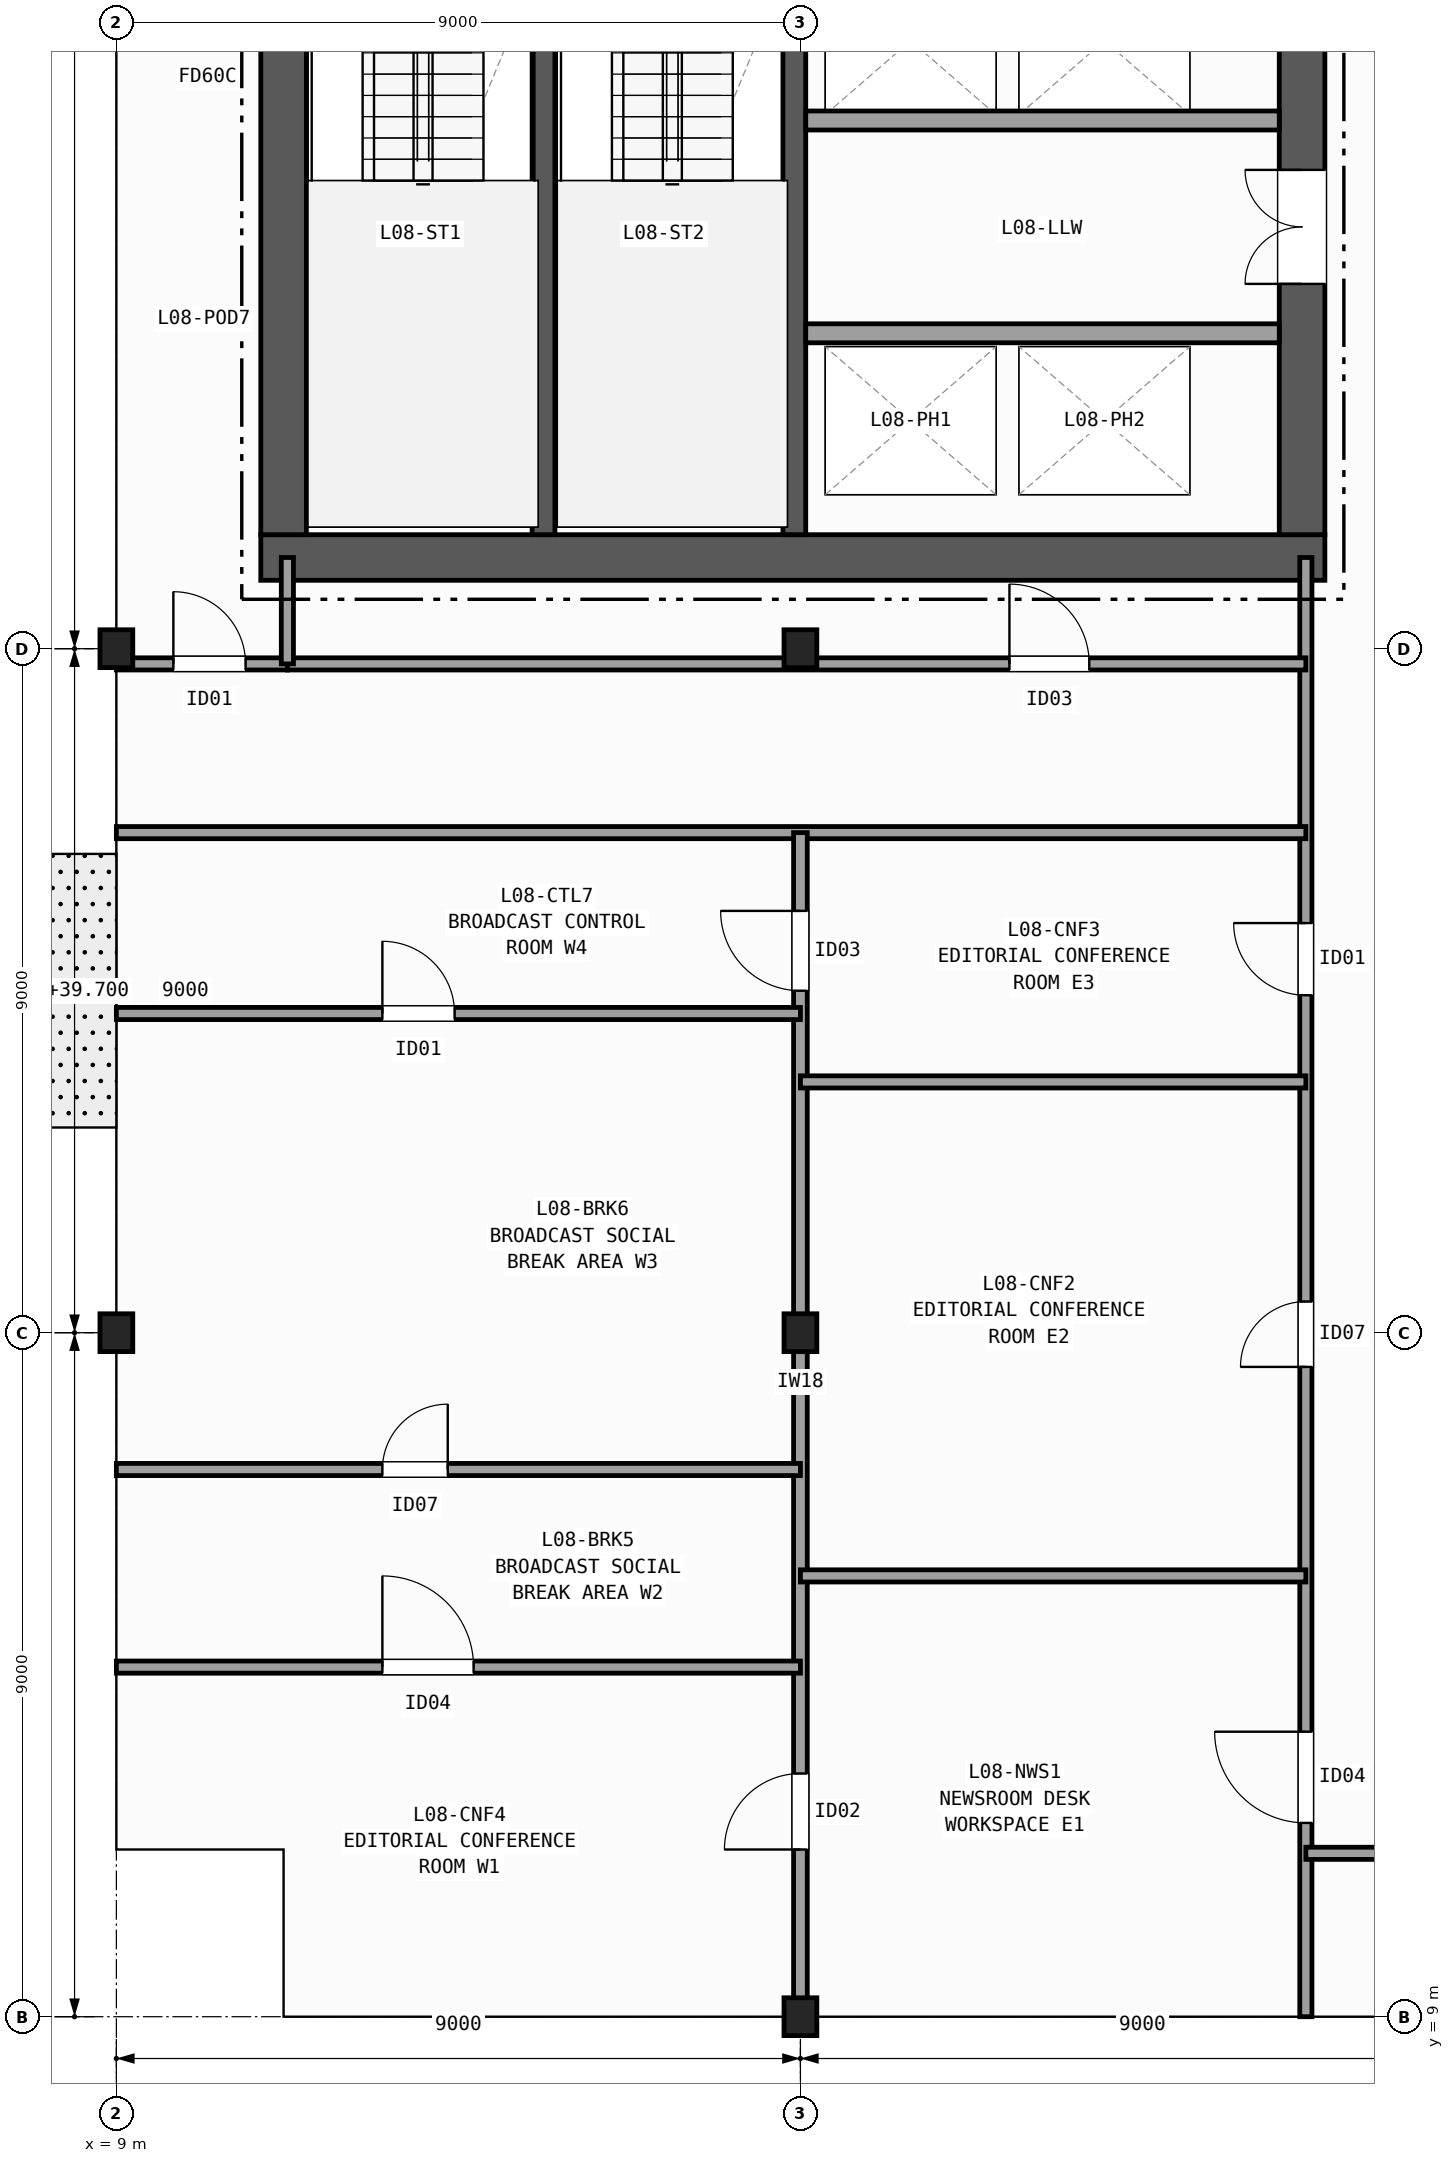
"""IFC4 building model, lengths in metres.
Left out: names, types, materials, properties, quantities, classifications, styles, units other than length and angle.
Written with IfcOpenShell. Run it as: python <this file> out.ifc"""

import sys

from ifc_helpers import new_model, si_unit, direction, frame, frame_2d, origin, origin_2d, place, context, subcontext, project, spatial, rectangle, i_section, extrude, element, fill, save


model = new_model("IFC4")
c1 = context("Model", 3, precision=1e-05, world=origin(), true_north=direction((0.0, 1.0)))
c2 = subcontext(c1, "Body", "Model", "MODEL_VIEW")
j1 = project(units=[si_unit("LENGTHUNIT", "METRE"), si_unit("PLANEANGLEUNIT", "RADIAN")], contexts=[c1])
p1 = place(None, origin())
s1 = spatial("IfcSite", under=j1, at=p1, CompositionType="ELEMENT")
p2 = place(p1, origin())
s2 = spatial("IfcBuilding", under=s1, at=p2, CompositionType="ELEMENT")
p3 = place(p2, frame((0.0, 0.0, 39.7)))
s3 = spatial("IfcBuildingStorey", under=s2, at=p3, CompositionType="ELEMENT", Elevation=39.7)
for number, where, z_axis, x_axis in (
    (1, (9.0, 18.0, 0.0), (0.0, 0.0, 1.0), (1.0, 0.0, 0.0)),
    (2, (9.0, 27.0, 0.0), (0.0, 0.0, 1.0), (1.0, 0.0, 0.0)),
    (3, (18.0, 9.0, 0.0), (0.0, 0.0, 1.0), (1.0, 0.0, 0.0)),
    (4, (18.0, 18.0, 0.0), (0.0, 0.0, 1.0), (1.0, 0.0, 0.0)),
    (5, (18.0, 27.0, 0.0), (0.0, 0.0, 1.0), (1.0, 0.0, 0.0)),
):
    element("IfcColumn", number, at=place(p3, frame(where, z_axis=z_axis, x_axis=x_axis)), inside=s3, PredefinedType="COLUMN", context=c2, shape_type="SweptSolid", body=[
        extrude(i_section(OverallWidth=0.432, OverallDepth=0.498, WebThickness=0.056, FlangeThickness=0.089, FilletRadius=0.015, at=origin_2d()), origin(), (0.0, 0.0, 1.0), 3.7),
    ])
p4 = place(p3, frame((10.9, 28.2, 0.0), z_axis=(0.0, 0.0, 1.0), x_axis=(1.0, 0.0, 0.0)))
e6 = element("IfcWall", 6, at=p4, inside=s3, PredefinedType="SHEAR", context=c2, shape_type="SweptSolid", body=[
    extrude(rectangle(XDim=14.0, YDim=0.6, at=frame_2d((7.0, 0.0))), origin(), (0.0, 0.0, 1.0), 3.42),
])
p5 = place(p3, frame((11.2, 42.1, 0.0), z_axis=(0.0, 0.0, 1.0), x_axis=(0.0, -1.0, 0.0)))
e7 = element("IfcWall", 7, at=p5, inside=s3, PredefinedType="SHEAR", context=c2, shape_type="SweptSolid", body=[
    extrude(rectangle(XDim=13.6, YDim=0.6, at=frame_2d((6.8, 0.0))), origin(), (0.0, 0.0, 1.0), 3.42),
])
p6 = place(p3, frame((24.6, 28.5, 0.0), z_axis=(0.0, 0.0, 1.0), x_axis=(0.0, 1.0, 0.0)))
e8 = element("IfcWall", 8, at=p6, inside=s3, PredefinedType="SHEAR", context=c2, shape_type="SweptSolid", body=[
    extrude(rectangle(XDim=13.6, YDim=0.6, at=frame_2d((6.8, 0.0))), origin(), (0.0, 0.0, 1.0), 3.42),
])
p7 = place(p6, frame((3.3, 0.0, 0.0)))
e9 = element("IfcOpeningElement", 9, at=p7, cuts=e8, PredefinedType="OPENING", context=c2, shape_type="SweptSolid", body=[
    extrude(rectangle(XDim=1.5, YDim=2.2, at=frame_2d((0.75, 1.1))), frame((0.0, 0.31, 0.0), z_axis=(0.0, -1.0, 0.0), x_axis=(1.0, 0.0, 0.0)), (0.0, 0.0, 1.0), 0.62),
])
p8 = place(p6, frame((9.9, 0.0, 0.0)))
e10 = element("IfcOpeningElement", 10, at=p8, cuts=e8, PredefinedType="OPENING", context=c2, shape_type="SweptSolid", body=[
    extrude(rectangle(XDim=0.9, YDim=2.1, at=frame_2d((0.45, 1.05))), frame((0.0, 0.31, 0.0), z_axis=(0.0, -1.0, 0.0), x_axis=(1.0, 0.0, 0.0)), (0.0, 0.0, 1.0), 0.62),
])
p9 = place(p3, frame((14.62, 28.5, 0.0), z_axis=(0.0, 0.0, 1.0), x_axis=(0.0, 1.0, 0.0)))
e11 = element("IfcWall", 11, at=p9, inside=s3, PredefinedType="SHEAR", context=c2, shape_type="SweptSolid", body=[
    extrude(rectangle(XDim=8.95, YDim=0.3, at=frame_2d((4.475, 0.0))), origin(), (0.0, 0.0, 1.0), 3.42),
])
p10 = place(p3, frame((17.92, 42.1, 0.0), z_axis=(0.0, 0.0, 1.0), x_axis=(0.0, -1.0, 0.0)))
e12 = element("IfcWall", 12, at=p10, inside=s3, PredefinedType="SHEAR", context=c2, shape_type="SweptSolid", body=[
    extrude(rectangle(XDim=13.6, YDim=0.3, at=frame_2d((6.8, 0.0))), origin(), (0.0, 0.0, 1.0), 3.42),
])
p11 = place(p10, frame((1.925, 0.0, 0.0)))
e13 = element("IfcOpeningElement", 13, at=p11, cuts=e12, PredefinedType="OPENING", context=c2, shape_type="SweptSolid", body=[
    extrude(rectangle(XDim=1.15, YDim=2.15, at=frame_2d((0.575, 1.075))), frame((0.0, 0.16, 0.0), z_axis=(0.0, -1.0, 0.0), x_axis=(1.0, 0.0, 0.0)), (0.0, 0.0, 1.0), 0.32),
])
for number, where, z_axis, x_axis in (
    (14, (18.07, 31.15, 0.0), (0.0, 0.0, 1.0), (1.0, 0.0, 0.0)),
    (15, (24.3, 33.95, 0.0), (0.0, 0.0, 1.0), (-1.0, 0.0, 0.0)),
):
    element("IfcWall", number, at=place(p3, frame(where, z_axis=z_axis, x_axis=x_axis)), inside=s3, PredefinedType="PARTITIONING", context=c2, shape_type="SweptSolid", body=[
        extrude(rectangle(XDim=6.23, YDim=0.25, at=frame_2d((3.115, 0.0))), origin(), (0.0, 0.0, 1.0), 3.42),
    ])
p12 = place(p3, frame((9.0, 26.8, 0.0), z_axis=(0.0, 0.0, 1.0), x_axis=(1.0, 0.0, 0.0)))
e16 = element("IfcWall", 16, at=p12, inside=s3, PredefinedType="PARTITIONING", context=c2, shape_type="SweptSolid", body=[
    extrude(rectangle(XDim=2.25, YDim=0.16, at=frame_2d((1.125, 0.0))), origin(), (0.0, 0.0, 1.0), 2.627),
])
p13 = place(p12, frame((0.75, 0.0, 0.0)))
e17 = element("IfcOpeningElement", 17, at=p13, cuts=e16, PredefinedType="OPENING", context=c2, shape_type="SweptSolid", body=[
    extrude(rectangle(XDim=0.95, YDim=2.1, at=frame_2d((0.475, 1.05))), frame((0.0, 0.09, 0.0), z_axis=(0.0, -1.0, 0.0), x_axis=(1.0, 0.0, 0.0)), (0.0, 0.0, 1.0), 0.18),
])
p14 = place(p3, frame((24.65, 9.0, 0.0), z_axis=(0.0, 0.0, 1.0), x_axis=(0.0, 1.0, 0.0)))
e18 = element("IfcWall", 18, at=p14, inside=s3, PredefinedType="PARTITIONING", context=c2, shape_type="SweptSolid", body=[
    extrude(rectangle(XDim=19.2, YDim=0.16, at=frame_2d((9.6, 0.0))), origin(), (0.0, 0.0, 1.0), 2.627),
])
p15 = place(p14, frame((2.55, 0.0, 0.0)))
e19 = element("IfcOpeningElement", 19, at=p15, cuts=e18, PredefinedType="OPENING", context=c2, shape_type="SweptSolid", body=[
    extrude(rectangle(XDim=1.2, YDim=2.15, at=frame_2d((0.6, 1.075))), frame((0.0, 0.09, 0.0), z_axis=(0.0, -1.0, 0.0), x_axis=(1.0, 0.0, 0.0)), (0.0, 0.0, 1.0), 0.18),
])
p16 = place(p14, frame((8.55, 0.0, 0.0)))
e20 = element("IfcOpeningElement", 20, at=p16, cuts=e18, PredefinedType="OPENING", context=c2, shape_type="SweptSolid", body=[
    extrude(rectangle(XDim=0.86, YDim=2.05, at=frame_2d((0.43, 1.025))), frame((0.0, 0.09, 0.0), z_axis=(0.0, -1.0, 0.0), x_axis=(1.0, 0.0, 0.0)), (0.0, 0.0, 1.0), 0.18),
])
p17 = place(p14, frame((13.44, 0.0, 0.0)))
e21 = element("IfcOpeningElement", 21, at=p17, cuts=e18, PredefinedType="OPENING", context=c2, shape_type="SweptSolid", body=[
    extrude(rectangle(XDim=0.95, YDim=2.1, at=frame_2d((0.475, 1.05))), frame((0.0, 0.09, 0.0), z_axis=(0.0, -1.0, 0.0), x_axis=(1.0, 0.0, 0.0)), (0.0, 0.0, 1.0), 0.18),
])
p18 = place(p3, frame((9.0, 24.58, 0.0), z_axis=(0.0, 0.0, 1.0), x_axis=(1.0, 0.0, 0.0)))
e22 = element("IfcWall", 22, at=p18, inside=s3, PredefinedType="PARTITIONING", context=c2, shape_type="SweptSolid", body=[
    extrude(rectangle(XDim=15.65, YDim=0.16, at=frame_2d((7.825, 0.0))), origin(), (0.0, 0.0, 1.0), 2.627),
])
p19 = place(p3, frame((11.25, 26.8, 0.0), z_axis=(0.0, 0.0, 1.0), x_axis=(1.0, 0.0, 0.0)))
e23 = element("IfcWall", 23, at=p19, inside=s3, PredefinedType="PARTITIONING", context=c2, shape_type="SweptSolid", body=[
    extrude(rectangle(XDim=13.4, YDim=0.16, at=frame_2d((6.7, 0.0))), origin(), (0.0, 0.0, 1.0), 2.789),
])
p20 = place(p19, frame((9.5, 0.0, 0.0)))
e24 = element("IfcOpeningElement", 24, at=p20, cuts=e23, PredefinedType="OPENING", context=c2, shape_type="SweptSolid", body=[
    extrude(rectangle(XDim=1.05, YDim=2.15, at=frame_2d((0.525, 1.075))), frame((0.0, 0.09, 0.0), z_axis=(0.0, -1.0, 0.0), x_axis=(1.0, 0.0, 0.0)), (0.0, 0.0, 1.0), 0.18),
])
p21 = place(p3, frame((11.25, 26.8, 0.0), z_axis=(0.0, 0.0, 1.0), x_axis=(0.0, 1.0, 0.0)))
e25 = element("IfcWall", 25, at=p21, inside=s3, PredefinedType="PARTITIONING", context=c2, shape_type="SweptSolid", body=[
    extrude(rectangle(XDim=1.4, YDim=0.16, at=frame_2d((0.7, 0.0))), origin(), (0.0, 0.0, 1.0), 2.789),
])
p22 = place(p3, frame((18.0, 9.0, 0.0), z_axis=(0.0, 0.0, 1.0), x_axis=(0.0, 1.0, 0.0)))
e26 = element("IfcWall", 26, at=p22, inside=s3, PredefinedType="PARTITIONING", context=c2, shape_type="SweptSolid", body=[
    extrude(rectangle(XDim=15.58, YDim=0.18, at=frame_2d((7.79, 0.0))), origin(), (0.0, 0.0, 1.0), 2.627),
])
p23 = place(p22, frame((2.2, 0.0, 0.0)))
e27 = element("IfcOpeningElement", 27, at=p23, cuts=e26, PredefinedType="OPENING", context=c2, shape_type="SweptSolid", body=[
    extrude(rectangle(XDim=1.0, YDim=2.1, at=frame_2d((0.5, 1.05))), frame((0.0, 0.1, 0.0), z_axis=(0.0, -1.0, 0.0), x_axis=(1.0, 0.0, 0.0)), (0.0, 0.0, 1.0), 0.2),
])
p24 = place(p22, frame((13.5, 0.0, 0.0)))
e28 = element("IfcOpeningElement", 28, at=p24, cuts=e26, PredefinedType="OPENING", context=c2, shape_type="SweptSolid", body=[
    extrude(rectangle(XDim=1.05, YDim=2.15, at=frame_2d((0.525, 1.075))), frame((0.0, 0.1, 0.0), z_axis=(0.0, -1.0, 0.0), x_axis=(1.0, 0.0, 0.0)), (0.0, 0.0, 1.0), 0.2),
])
p25 = place(p3, frame((18.0, 14.8, 0.0), z_axis=(0.0, 0.0, 1.0), x_axis=(1.0, 0.0, 0.0)))
e29 = element("IfcWall", 29, at=p25, inside=s3, PredefinedType="PARTITIONING", context=c2, shape_type="SweptSolid", body=[
    extrude(rectangle(XDim=6.65, YDim=0.16, at=frame_2d((3.325, 0.0))), origin(), (0.0, 0.0, 1.0), 2.789),
])
p26 = place(p3, frame((18.0, 21.3, 0.0), z_axis=(0.0, 0.0, 1.0), x_axis=(1.0, 0.0, 0.0)))
e30 = element("IfcWall", 30, at=p26, inside=s3, PredefinedType="PARTITIONING", context=c2, shape_type="SweptSolid", body=[
    extrude(rectangle(XDim=6.65, YDim=0.16, at=frame_2d((3.325, 0.0))), origin(), (0.0, 0.0, 1.0), 2.792),
])
p27 = place(p3, frame((9.0, 13.6, 0.0), z_axis=(0.0, 0.0, 1.0), x_axis=(1.0, 0.0, 0.0)))
e31 = element("IfcWall", 31, at=p27, inside=s3, PredefinedType="PARTITIONING", context=c2, shape_type="SweptSolid", body=[
    extrude(rectangle(XDim=9.0, YDim=0.16, at=frame_2d((4.5, 0.0))), origin(), (0.0, 0.0, 1.0), 2.792),
])
p28 = place(p27, frame((3.5, 0.0, 0.0)))
e32 = element("IfcOpeningElement", 32, at=p28, cuts=e31, PredefinedType="OPENING", context=c2, shape_type="SweptSolid", body=[
    extrude(rectangle(XDim=1.2, YDim=2.15, at=frame_2d((0.6, 1.075))), frame((0.0, 0.09, 0.0), z_axis=(0.0, -1.0, 0.0), x_axis=(1.0, 0.0, 0.0)), (0.0, 0.0, 1.0), 0.18),
])
p29 = place(p3, frame((9.0, 16.2, 0.0), z_axis=(0.0, 0.0, 1.0), x_axis=(1.0, 0.0, 0.0)))
e33 = element("IfcWall", 33, at=p29, inside=s3, PredefinedType="PARTITIONING", context=c2, shape_type="SweptSolid", body=[
    extrude(rectangle(XDim=9.0, YDim=0.16, at=frame_2d((4.5, 0.0))), origin(), (0.0, 0.0, 1.0), 2.792),
])
p30 = place(p29, frame((3.5, 0.0, 0.0)))
e34 = element("IfcOpeningElement", 34, at=p30, cuts=e33, PredefinedType="OPENING", context=c2, shape_type="SweptSolid", body=[
    extrude(rectangle(XDim=0.86, YDim=2.05, at=frame_2d((0.43, 1.025))), frame((0.0, 0.09, 0.0), z_axis=(0.0, -1.0, 0.0), x_axis=(1.0, 0.0, 0.0)), (0.0, 0.0, 1.0), 0.18),
])
p31 = place(p3, frame((9.0, 22.2, 0.0), z_axis=(0.0, 0.0, 1.0), x_axis=(1.0, 0.0, 0.0)))
e35 = element("IfcWall", 35, at=p31, inside=s3, PredefinedType="PARTITIONING", context=c2, shape_type="SweptSolid", body=[
    extrude(rectangle(XDim=9.0, YDim=0.16, at=frame_2d((4.5, 0.0))), origin(), (0.0, 0.0, 1.0), 2.627),
])
p32 = place(p31, frame((3.5, 0.0, 0.0)))
e36 = element("IfcOpeningElement", 36, at=p32, cuts=e35, PredefinedType="OPENING", context=c2, shape_type="SweptSolid", body=[
    extrude(rectangle(XDim=0.95, YDim=2.1, at=frame_2d((0.475, 1.05))), frame((0.0, 0.09, 0.0), z_axis=(0.0, -1.0, 0.0), x_axis=(1.0, 0.0, 0.0)), (0.0, 0.0, 1.0), 0.18),
])
p33 = place(p3, frame((24.65, 11.15, 0.0), z_axis=(0.0, 0.0, 1.0), x_axis=(1.0, 0.0, 0.0)))
e37 = element("IfcWall", 37, at=p33, inside=s3, PredefinedType="PARTITIONING", context=c2, shape_type="SweptSolid", body=[
    extrude(rectangle(XDim=4.75, YDim=0.16, at=frame_2d((2.375, 0.0))), origin(), (0.0, 0.0, 1.0), 2.792),
])
p34 = place(p33, frame((1.2, 0.0, 0.0)))
e38 = element("IfcOpeningElement", 38, at=p34, cuts=e37, PredefinedType="OPENING", context=c2, shape_type="SweptSolid", body=[
    extrude(rectangle(XDim=0.86, YDim=2.05, at=frame_2d((0.43, 1.025))), frame((0.0, 0.09, 0.0), z_axis=(0.0, -1.0, 0.0), x_axis=(1.0, 0.0, 0.0)), (0.0, 0.0, 1.0), 0.18),
])
p35 = place(p7, origin())
e39 = element("IfcDoor", 39, at=p35, inside=s3, OperationType="DOUBLE_DOOR_SINGLE_SWING", PredefinedType="DOOR", context=c2, shape_type="SweptSolid", body=[
    extrude(rectangle(XDim=1.5, YDim=2.2, at=frame_2d((0.75, 1.1))), frame((0.0, 0.025, 0.0), z_axis=(0.0, -1.0, 0.0), x_axis=(1.0, 0.0, 0.0)), (0.0, 0.0, 1.0), 0.05),
])
fill(e9, e39)
p36 = place(p13, origin())
e40 = element("IfcDoor", 40, at=p36, inside=s3, OperationType="SINGLE_SWING_LEFT", PredefinedType="DOOR", context=c2, shape_type="SweptSolid", body=[
    extrude(rectangle(XDim=0.95, YDim=2.1, at=frame_2d((0.475, 1.05))), frame((0.0, 0.025, 0.0), z_axis=(0.0, -1.0, 0.0), x_axis=(1.0, 0.0, 0.0)), (0.0, 0.0, 1.0), 0.05),
])
fill(e17, e40)
p37 = place(p20, origin())
e41 = element("IfcDoor", 41, at=p37, inside=s3, OperationType="SINGLE_SWING_LEFT", PredefinedType="DOOR", context=c2, shape_type="SweptSolid", body=[
    extrude(rectangle(XDim=1.05, YDim=2.15, at=frame_2d((0.525, 1.075))), frame((0.0, 0.025, 0.0), z_axis=(0.0, -1.0, 0.0), x_axis=(1.0, 0.0, 0.0)), (0.0, 0.0, 1.0), 0.05),
])
fill(e24, e41)
p38 = place(p15, origin())
e42 = element("IfcDoor", 42, at=p38, inside=s3, OperationType="SINGLE_SWING_RIGHT", PredefinedType="DOOR", context=c2, shape_type="SweptSolid", body=[
    extrude(rectangle(XDim=1.2, YDim=2.15, at=frame_2d((0.6, 1.075))), frame((0.0, 0.025, 0.0), z_axis=(0.0, -1.0, 0.0), x_axis=(1.0, 0.0, 0.0)), (0.0, 0.0, 1.0), 0.05),
])
fill(e19, e42)
p39 = place(p16, origin())
e43 = element("IfcDoor", 43, at=p39, inside=s3, OperationType="SINGLE_SWING_LEFT", PredefinedType="DOOR", context=c2, shape_type="SweptSolid", body=[
    extrude(rectangle(XDim=0.86, YDim=2.05, at=frame_2d((0.43, 1.025))), frame((0.0, 0.025, 0.0), z_axis=(0.0, -1.0, 0.0), x_axis=(1.0, 0.0, 0.0)), (0.0, 0.0, 1.0), 0.05),
])
fill(e20, e43)
p40 = place(p17, origin())
e44 = element("IfcDoor", 44, at=p40, inside=s3, OperationType="SINGLE_SWING_RIGHT", PredefinedType="DOOR", context=c2, shape_type="SweptSolid", body=[
    extrude(rectangle(XDim=0.95, YDim=2.1, at=frame_2d((0.475, 1.05))), frame((0.0, 0.025, 0.0), z_axis=(0.0, -1.0, 0.0), x_axis=(1.0, 0.0, 0.0)), (0.0, 0.0, 1.0), 0.05),
])
fill(e21, e44)
p41 = place(p23, origin())
e45 = element("IfcDoor", 45, at=p41, inside=s3, OperationType="SINGLE_SWING_LEFT", PredefinedType="DOOR", context=c2, shape_type="SweptSolid", body=[
    extrude(rectangle(XDim=1.0, YDim=2.1, at=frame_2d((0.5, 1.05))), frame((0.0, 0.025, 0.0), z_axis=(0.0, -1.0, 0.0), x_axis=(1.0, 0.0, 0.0)), (0.0, 0.0, 1.0), 0.05),
])
fill(e27, e45)
p42 = place(p24, origin())
e46 = element("IfcDoor", 46, at=p42, inside=s3, OperationType="SINGLE_SWING_RIGHT", PredefinedType="DOOR", context=c2, shape_type="SweptSolid", body=[
    extrude(rectangle(XDim=1.05, YDim=2.15, at=frame_2d((0.525, 1.075))), frame((0.0, 0.025, 0.0), z_axis=(0.0, -1.0, 0.0), x_axis=(1.0, 0.0, 0.0)), (0.0, 0.0, 1.0), 0.05),
])
fill(e28, e46)
p43 = place(p28, origin())
e47 = element("IfcDoor", 47, at=p43, inside=s3, OperationType="SINGLE_SWING_LEFT", PredefinedType="DOOR", context=c2, shape_type="SweptSolid", body=[
    extrude(rectangle(XDim=1.2, YDim=2.15, at=frame_2d((0.6, 1.075))), frame((0.0, 0.025, 0.0), z_axis=(0.0, -1.0, 0.0), x_axis=(1.0, 0.0, 0.0)), (0.0, 0.0, 1.0), 0.05),
])
fill(e32, e47)
p44 = place(p30, origin())
e48 = element("IfcDoor", 48, at=p44, inside=s3, OperationType="SINGLE_SWING_RIGHT", PredefinedType="DOOR", context=c2, shape_type="SweptSolid", body=[
    extrude(rectangle(XDim=0.86, YDim=2.05, at=frame_2d((0.43, 1.025))), frame((0.0, 0.025, 0.0), z_axis=(0.0, -1.0, 0.0), x_axis=(1.0, 0.0, 0.0)), (0.0, 0.0, 1.0), 0.05),
])
fill(e34, e48)
p45 = place(p32, origin())
e49 = element("IfcDoor", 49, at=p45, inside=s3, OperationType="SINGLE_SWING_LEFT", PredefinedType="DOOR", context=c2, shape_type="SweptSolid", body=[
    extrude(rectangle(XDim=0.95, YDim=2.1, at=frame_2d((0.475, 1.05))), frame((0.0, 0.025, 0.0), z_axis=(0.0, -1.0, 0.0), x_axis=(1.0, 0.0, 0.0)), (0.0, 0.0, 1.0), 0.05),
])
fill(e36, e49)
save(model, sys.argv[1])
